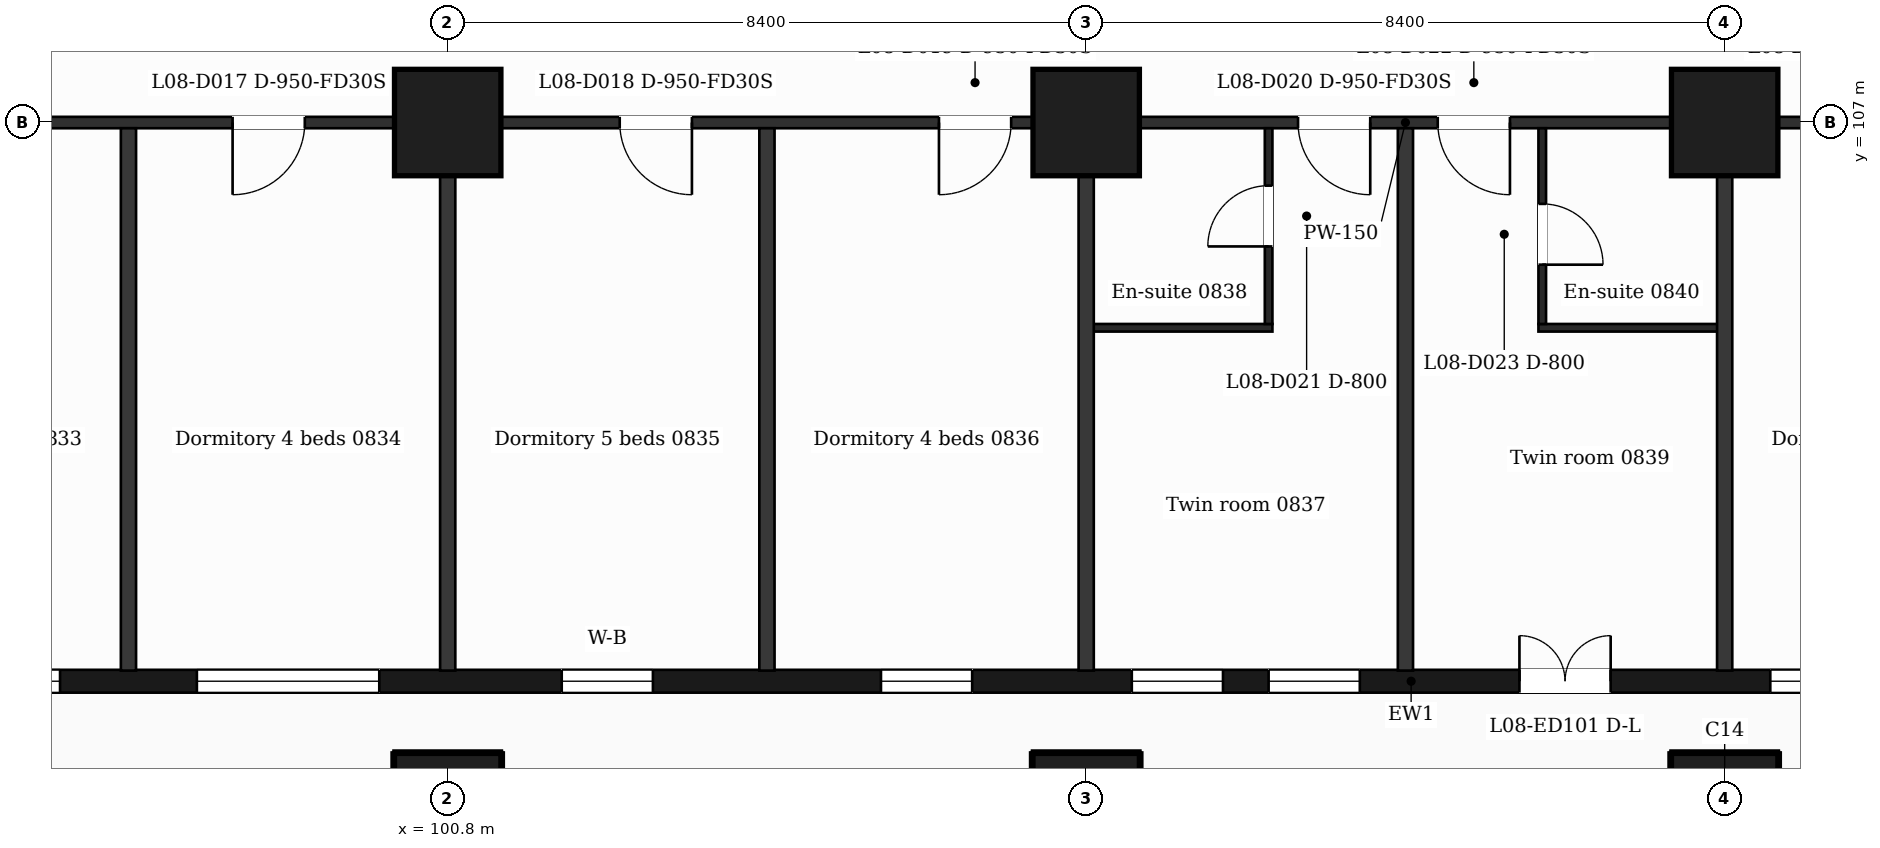
"""IFC4 building model, lengths in metres.
Left out: names, types, materials, properties, quantities, classifications, styles, units other than length and angle.
Written with IfcOpenShell. Run it as: python <this file> out.ifc"""

import sys

from ifc_helpers import new_model, si_unit, direction, frame, frame_2d, origin, origin_2d, place, context, subcontext, project, spatial, rectangle, extrude, element, fill, save


model = new_model("IFC4")
c1 = context("Model", 3, precision=1e-05, world=origin(), true_north=direction((0.0, 1.0)))
c2 = subcontext(c1, "Body", "Model", "MODEL_VIEW")
j1 = project(units=[si_unit("LENGTHUNIT", "METRE"), si_unit("PLANEANGLEUNIT", "RADIAN")], contexts=[c1])
p1 = place(None, origin())
s1 = spatial("IfcSite", under=j1, at=p1, CompositionType="ELEMENT")
p2 = place(p1, origin())
s2 = spatial("IfcBuilding", under=s1, at=p2, CompositionType="ELEMENT")
p3 = place(p2, frame((0.0, 0.0, 46.0)))
s3 = spatial("IfcBuildingStorey", under=s2, at=p3, CompositionType="ELEMENT", Elevation=46.0)
for number, where, z_axis, x_axis in (
    (1, (100.8, 98.0, 0.0), (0.0, 0.0, 1.0), (1.0, 0.0, 0.0)),
    (2, (109.2, 98.0, 0.0), (0.0, 0.0, 1.0), (1.0, 0.0, 0.0)),
    (3, (117.6, 98.0, 0.0), (0.0, 0.0, 1.0), (1.0, 0.0, 0.0)),
    (4, (100.8, 107.0, 0.0), (0.0, 0.0, 1.0), (1.0, 0.0, 0.0)),
    (5, (109.2, 107.0, 0.0), (0.0, 0.0, 1.0), (1.0, 0.0, 0.0)),
    (6, (117.6, 107.0, 0.0), (0.0, 0.0, 1.0), (1.0, 0.0, 0.0)),
):
    element("IfcColumn", number, at=place(p3, frame(where, z_axis=z_axis, x_axis=x_axis)), inside=s3, PredefinedType="COLUMN", context=c2, shape_type="SweptSolid", body=[
        extrude(rectangle(XDim=1.4, YDim=1.4, at=origin_2d()), origin(), (0.0, 0.0, 1.0), 3.5),
    ])
p4 = place(p3, frame((89.85, 99.65, 0.0), z_axis=(0.0, 0.0, 1.0), x_axis=(1.0, 0.0, 0.0)))
e7 = element("IfcWall", 7, at=p4, inside=s3, PredefinedType="SOLIDWALL", context=c2, shape_type="SweptSolid", body=[
    extrude(rectangle(XDim=47.25, YDim=0.3, at=frame_2d((23.625, 0.0))), origin(), (0.0, 0.0, 1.0), 3.18),
])
p5 = place(p4, frame((0.725, 0.0, 0.9)))
e8 = element("IfcOpeningElement", 8, at=p5, cuts=e7, PredefinedType="OPENING", context=c2, shape_type="SweptSolid", body=[
    extrude(rectangle(XDim=1.2, YDim=2.1, at=frame_2d((0.6, 1.05))), frame((0.0, 0.16, 0.0), z_axis=(0.0, -1.0, 0.0), x_axis=(1.0, 0.0, 0.0)), (0.0, 0.0, 1.0), 0.32),
])
p6 = place(p4, frame((3.45, 0.0, 0.9)))
e9 = element("IfcOpeningElement", 9, at=p6, cuts=e7, PredefinedType="OPENING", context=c2, shape_type="SweptSolid", body=[
    extrude(rectangle(XDim=2.4, YDim=2.1, at=frame_2d((1.2, 1.05))), frame((0.0, 0.16, 0.0), z_axis=(0.0, -1.0, 0.0), x_axis=(1.0, 0.0, 0.0)), (0.0, 0.0, 1.0), 0.32),
])
p7 = place(p4, frame((7.65, 0.0, 0.9)))
e10 = element("IfcOpeningElement", 10, at=p7, cuts=e7, PredefinedType="OPENING", context=c2, shape_type="SweptSolid", body=[
    extrude(rectangle(XDim=2.4, YDim=2.1, at=frame_2d((1.2, 1.05))), frame((0.0, 0.16, 0.0), z_axis=(0.0, -1.0, 0.0), x_axis=(1.0, 0.0, 0.0)), (0.0, 0.0, 1.0), 0.32),
])
p8 = place(p4, frame((12.45, 0.0, 0.9)))
e11 = element("IfcOpeningElement", 11, at=p8, cuts=e7, PredefinedType="OPENING", context=c2, shape_type="SweptSolid", body=[
    extrude(rectangle(XDim=1.2, YDim=2.1, at=frame_2d((0.6, 1.05))), frame((0.0, 0.16, 0.0), z_axis=(0.0, -1.0, 0.0), x_axis=(1.0, 0.0, 0.0)), (0.0, 0.0, 1.0), 0.32),
])
p9 = place(p4, frame((16.65, 0.0, 0.9)))
e12 = element("IfcOpeningElement", 12, at=p9, cuts=e7, PredefinedType="OPENING", context=c2, shape_type="SweptSolid", body=[
    extrude(rectangle(XDim=1.2, YDim=2.1, at=frame_2d((0.6, 1.05))), frame((0.0, 0.16, 0.0), z_axis=(0.0, -1.0, 0.0), x_axis=(1.0, 0.0, 0.0)), (0.0, 0.0, 1.0), 0.32),
])
p10 = place(p4, frame((19.95, 0.0, 0.9)))
e13 = element("IfcOpeningElement", 13, at=p10, cuts=e7, PredefinedType="OPENING", context=c2, shape_type="SweptSolid", body=[
    extrude(rectangle(XDim=1.2, YDim=2.1, at=frame_2d((0.6, 1.05))), frame((0.0, 0.16, 0.0), z_axis=(0.0, -1.0, 0.0), x_axis=(1.0, 0.0, 0.0)), (0.0, 0.0, 1.0), 0.32),
])
p11 = place(p4, frame((21.75, 0.0, 0.9)))
e14 = element("IfcOpeningElement", 14, at=p11, cuts=e7, PredefinedType="OPENING", context=c2, shape_type="SweptSolid", body=[
    extrude(rectangle(XDim=1.2, YDim=2.1, at=frame_2d((0.6, 1.05))), frame((0.0, 0.16, 0.0), z_axis=(0.0, -1.0, 0.0), x_axis=(1.0, 0.0, 0.0)), (0.0, 0.0, 1.0), 0.32),
])
p12 = place(p4, frame((25.05, 0.0, 0.0)))
e15 = element("IfcOpeningElement", 15, at=p12, cuts=e7, PredefinedType="OPENING", context=c2, shape_type="SweptSolid", body=[
    extrude(rectangle(XDim=1.2, YDim=2.4, at=frame_2d((0.6, 1.2))), frame((0.0, 0.16, 0.0), z_axis=(0.0, -1.0, 0.0), x_axis=(1.0, 0.0, 0.0)), (0.0, 0.0, 1.0), 0.32),
])
p13 = place(p4, frame((28.35, 0.0, 0.9)))
e16 = element("IfcOpeningElement", 16, at=p13, cuts=e7, PredefinedType="OPENING", context=c2, shape_type="SweptSolid", body=[
    extrude(rectangle(XDim=1.2, YDim=2.1, at=frame_2d((0.6, 1.05))), frame((0.0, 0.16, 0.0), z_axis=(0.0, -1.0, 0.0), x_axis=(1.0, 0.0, 0.0)), (0.0, 0.0, 1.0), 0.32),
])
p14 = place(p4, frame((30.15, 0.0, 0.9)))
e17 = element("IfcOpeningElement", 17, at=p14, cuts=e7, PredefinedType="OPENING", context=c2, shape_type="SweptSolid", body=[
    extrude(rectangle(XDim=1.2, YDim=2.1, at=frame_2d((0.6, 1.05))), frame((0.0, 0.16, 0.0), z_axis=(0.0, -1.0, 0.0), x_axis=(1.0, 0.0, 0.0)), (0.0, 0.0, 1.0), 0.32),
])
p15 = place(p4, frame((32.85, 0.0, 0.9)))
e18 = element("IfcOpeningElement", 18, at=p15, cuts=e7, PredefinedType="OPENING", context=c2, shape_type="SweptSolid", body=[
    extrude(rectangle(XDim=2.4, YDim=2.1, at=frame_2d((1.2, 1.05))), frame((0.0, 0.16, 0.0), z_axis=(0.0, -1.0, 0.0), x_axis=(1.0, 0.0, 0.0)), (0.0, 0.0, 1.0), 0.32),
])
p16 = place(p4, frame((37.05, 0.0, 0.9)))
e19 = element("IfcOpeningElement", 19, at=p16, cuts=e7, PredefinedType="OPENING", context=c2, shape_type="SweptSolid", body=[
    extrude(rectangle(XDim=2.4, YDim=2.1, at=frame_2d((1.2, 1.05))), frame((0.0, 0.16, 0.0), z_axis=(0.0, -1.0, 0.0), x_axis=(1.0, 0.0, 0.0)), (0.0, 0.0, 1.0), 0.32),
])
p17 = place(p4, frame((41.85, 0.0, 0.9)))
e20 = element("IfcOpeningElement", 20, at=p17, cuts=e7, PredefinedType="OPENING", context=c2, shape_type="SweptSolid", body=[
    extrude(rectangle(XDim=1.2, YDim=2.1, at=frame_2d((0.6, 1.05))), frame((0.0, 0.16, 0.0), z_axis=(0.0, -1.0, 0.0), x_axis=(1.0, 0.0, 0.0)), (0.0, 0.0, 1.0), 0.32),
])
p18 = place(p4, frame((45.25, 0.0, 0.9)))
e21 = element("IfcOpeningElement", 21, at=p18, cuts=e7, PredefinedType="OPENING", context=c2, shape_type="SweptSolid", body=[
    extrude(rectangle(XDim=1.2, YDim=2.1, at=frame_2d((0.6, 1.05))), frame((0.0, 0.16, 0.0), z_axis=(0.0, -1.0, 0.0), x_axis=(1.0, 0.0, 0.0)), (0.0, 0.0, 1.0), 0.32),
])
p19 = place(p3, frame((109.2, 104.3, 0.0), z_axis=(0.0, 0.0, 1.0), x_axis=(1.0, 0.0, 0.0)))
e22 = element("IfcWall", 22, at=p19, inside=s3, PredefinedType="PARTITIONING", context=c2, shape_type="SweptSolid", body=[
    extrude(rectangle(XDim=2.45, YDim=0.1, at=frame_2d((1.225, 0.0))), origin(), (0.0, 0.0, 1.0), 3.18),
])
p20 = place(p3, frame((115.15, 104.3, 0.0), z_axis=(0.0, 0.0, 1.0), x_axis=(1.0, 0.0, 0.0)))
e23 = element("IfcWall", 23, at=p20, inside=s3, PredefinedType="PARTITIONING", context=c2, shape_type="SweptSolid", body=[
    extrude(rectangle(XDim=2.45, YDim=0.1, at=frame_2d((1.225, 0.0))), origin(), (0.0, 0.0, 1.0), 3.18),
])
p21 = place(p3, frame((87.018, 107.0, 0.0), z_axis=(0.0, 0.0, 1.0), x_axis=(1.0, 0.0, 0.0)))
e24 = element("IfcWall", 24, at=p21, inside=s3, PredefinedType="PARTITIONING", context=c2, shape_type="SweptSolid", body=[
    extrude(rectangle(XDim=52.765, YDim=0.15, at=frame_2d((26.382, 0.0))), origin(), (0.0, 0.0, 1.0), 3.18),
])
p22 = place(p21, frame((1.032, 0.0, 0.0)))
e25 = element("IfcOpeningElement", 25, at=p22, cuts=e24, PredefinedType="OPENING", context=c2, shape_type="SweptSolid", body=[
    extrude(rectangle(XDim=0.95, YDim=2.1, at=frame_2d((0.475, 1.05))), frame((0.0, 0.085, 0.0), z_axis=(0.0, -1.0, 0.0), x_axis=(1.0, 0.0, 0.0)), (0.0, 0.0, 1.0), 0.17),
])
p23 = place(p21, frame((6.369, 0.0, 0.0)))
e26 = element("IfcOpeningElement", 26, at=p23, cuts=e24, PredefinedType="OPENING", context=c2, shape_type="SweptSolid", body=[
    extrude(rectangle(XDim=0.95, YDim=2.1, at=frame_2d((0.475, 1.05))), frame((0.0, 0.085, 0.0), z_axis=(0.0, -1.0, 0.0), x_axis=(1.0, 0.0, 0.0)), (0.0, 0.0, 1.0), 0.17),
])
p24 = place(p21, frame((10.952, 0.0, 0.0)))
e27 = element("IfcOpeningElement", 27, at=p24, cuts=e24, PredefinedType="OPENING", context=c2, shape_type="SweptSolid", body=[
    extrude(rectangle(XDim=0.95, YDim=2.1, at=frame_2d((0.475, 1.05))), frame((0.0, 0.085, 0.0), z_axis=(0.0, -1.0, 0.0), x_axis=(1.0, 0.0, 0.0)), (0.0, 0.0, 1.0), 0.17),
])
p25 = place(p21, frame((16.045, 0.0, 0.0)))
e28 = element("IfcOpeningElement", 28, at=p25, cuts=e24, PredefinedType="OPENING", context=c2, shape_type="SweptSolid", body=[
    extrude(rectangle(XDim=0.95, YDim=2.1, at=frame_2d((0.475, 1.05))), frame((0.0, 0.085, 0.0), z_axis=(0.0, -1.0, 0.0), x_axis=(1.0, 0.0, 0.0)), (0.0, 0.0, 1.0), 0.17),
])
p26 = place(p21, frame((20.245, 0.0, 0.0)))
e29 = element("IfcOpeningElement", 29, at=p26, cuts=e24, PredefinedType="OPENING", context=c2, shape_type="SweptSolid", body=[
    extrude(rectangle(XDim=0.95, YDim=2.1, at=frame_2d((0.475, 1.05))), frame((0.0, 0.085, 0.0), z_axis=(0.0, -1.0, 0.0), x_axis=(1.0, 0.0, 0.0)), (0.0, 0.0, 1.0), 0.17),
])
p27 = place(p21, frame((24.969, 0.0, 0.0)))
e30 = element("IfcOpeningElement", 30, at=p27, cuts=e24, PredefinedType="OPENING", context=c2, shape_type="SweptSolid", body=[
    extrude(rectangle(XDim=0.95, YDim=2.1, at=frame_2d((0.475, 1.05))), frame((0.0, 0.085, 0.0), z_axis=(0.0, -1.0, 0.0), x_axis=(1.0, 0.0, 0.0)), (0.0, 0.0, 1.0), 0.17),
])
p28 = place(p21, frame((26.807, 0.0, 0.0)))
e31 = element("IfcOpeningElement", 31, at=p28, cuts=e24, PredefinedType="OPENING", context=c2, shape_type="SweptSolid", body=[
    extrude(rectangle(XDim=0.95, YDim=2.1, at=frame_2d((0.475, 1.05))), frame((0.0, 0.085, 0.0), z_axis=(0.0, -1.0, 0.0), x_axis=(1.0, 0.0, 0.0)), (0.0, 0.0, 1.0), 0.17),
])
p29 = place(p21, frame((31.952, 0.0, 0.0)))
e32 = element("IfcOpeningElement", 32, at=p29, cuts=e24, PredefinedType="OPENING", context=c2, shape_type="SweptSolid", body=[
    extrude(rectangle(XDim=0.95, YDim=2.1, at=frame_2d((0.475, 1.05))), frame((0.0, 0.085, 0.0), z_axis=(0.0, -1.0, 0.0), x_axis=(1.0, 0.0, 0.0)), (0.0, 0.0, 1.0), 0.17),
])
p30 = place(p21, frame((40.795, 0.0, 0.0)))
e33 = element("IfcOpeningElement", 33, at=p30, cuts=e24, PredefinedType="OPENING", context=c2, shape_type="SweptSolid", body=[
    extrude(rectangle(XDim=0.95, YDim=2.1, at=frame_2d((0.475, 1.05))), frame((0.0, 0.085, 0.0), z_axis=(0.0, -1.0, 0.0), x_axis=(1.0, 0.0, 0.0)), (0.0, 0.0, 1.0), 0.17),
])
p31 = place(p21, frame((43.644, 0.0, 0.0)))
e34 = element("IfcOpeningElement", 34, at=p31, cuts=e24, PredefinedType="OPENING", context=c2, shape_type="SweptSolid", body=[
    extrude(rectangle(XDim=0.95, YDim=2.1, at=frame_2d((0.475, 1.05))), frame((0.0, 0.085, 0.0), z_axis=(0.0, -1.0, 0.0), x_axis=(1.0, 0.0, 0.0)), (0.0, 0.0, 1.0), 0.17),
])
p32 = place(p21, frame((48.767, 0.0, 0.0)))
e35 = element("IfcOpeningElement", 35, at=p32, cuts=e24, PredefinedType="OPENING", context=c2, shape_type="SweptSolid", body=[
    extrude(rectangle(XDim=0.95, YDim=2.1, at=frame_2d((0.475, 1.05))), frame((0.0, 0.085, 0.0), z_axis=(0.0, -1.0, 0.0), x_axis=(1.0, 0.0, 0.0)), (0.0, 0.0, 1.0), 0.17),
])
for number, where, z_axis, x_axis in (
    (36, (96.6, 99.79, 0.0), (0.0, 0.0, 1.0), (0.0, 1.0, 0.0)),
    (37, (100.8, 99.79, 0.0), (0.0, 0.0, 1.0), (0.0, 1.0, 0.0)),
    (38, (105.0, 99.79, 0.0), (0.0, 0.0, 1.0), (0.0, 1.0, 0.0)),
    (39, (109.2, 99.79, 0.0), (0.0, 0.0, 1.0), (0.0, 1.0, 0.0)),
):
    element("IfcWall", number, at=place(p3, frame(where, z_axis=z_axis, x_axis=x_axis)), inside=s3, PredefinedType="PARTITIONING", context=c2, shape_type="SweptSolid", body=[
        extrude(rectangle(XDim=7.135, YDim=0.2, at=frame_2d((3.567, 0.0))), origin(), (0.0, 0.0, 1.0), 3.18),
    ])
p33 = place(p3, frame((111.6, 104.35, 0.0), z_axis=(0.0, 0.0, 1.0), x_axis=(0.0, 1.0, 0.0)))
e40 = element("IfcWall", 40, at=p33, inside=s3, PredefinedType="PARTITIONING", context=c2, shape_type="SweptSolid", body=[
    extrude(rectangle(XDim=2.575, YDim=0.1, at=frame_2d((1.288, 0.0))), origin(), (0.0, 0.0, 1.0), 3.18),
])
p34 = place(p33, frame((1.02, 0.0, 0.0)))
e41 = element("IfcOpeningElement", 41, at=p34, cuts=e40, PredefinedType="OPENING", context=c2, shape_type="SweptSolid", body=[
    extrude(rectangle(XDim=0.8, YDim=2.1, at=frame_2d((0.4, 1.05))), frame((0.0, 0.06, 0.0), z_axis=(0.0, -1.0, 0.0), x_axis=(1.0, 0.0, 0.0)), (0.0, 0.0, 1.0), 0.12),
])
p35 = place(p3, frame((113.4, 99.79, 0.0), z_axis=(0.0, 0.0, 1.0), x_axis=(0.0, 1.0, 0.0)))
e42 = element("IfcWall", 42, at=p35, inside=s3, PredefinedType="PARTITIONING", context=c2, shape_type="SweptSolid", body=[
    extrude(rectangle(XDim=7.135, YDim=0.2, at=frame_2d((3.567, 0.0))), origin(), (0.0, 0.0, 1.0), 3.18),
])
p36 = place(p3, frame((115.2, 104.35, 0.0), z_axis=(0.0, 0.0, 1.0), x_axis=(0.0, 1.0, 0.0)))
e43 = element("IfcWall", 43, at=p36, inside=s3, PredefinedType="PARTITIONING", context=c2, shape_type="SweptSolid", body=[
    extrude(rectangle(XDim=2.575, YDim=0.1, at=frame_2d((1.288, 0.0))), origin(), (0.0, 0.0, 1.0), 3.18),
])
p37 = place(p36, frame((0.78, 0.0, 0.0)))
e44 = element("IfcOpeningElement", 44, at=p37, cuts=e43, PredefinedType="OPENING", context=c2, shape_type="SweptSolid", body=[
    extrude(rectangle(XDim=0.8, YDim=2.1, at=frame_2d((0.4, 1.05))), frame((0.0, 0.06, 0.0), z_axis=(0.0, -1.0, 0.0), x_axis=(1.0, 0.0, 0.0)), (0.0, 0.0, 1.0), 0.12),
])
p38 = place(p3, frame((117.6, 99.79, 0.0), z_axis=(0.0, 0.0, 1.0), x_axis=(0.0, 1.0, 0.0)))
e45 = element("IfcWall", 45, at=p38, inside=s3, PredefinedType="PARTITIONING", context=c2, shape_type="SweptSolid", body=[
    extrude(rectangle(XDim=7.135, YDim=0.2, at=frame_2d((3.567, 0.0))), origin(), (0.0, 0.0, 1.0), 3.18),
])
p39 = place(p6, origin())
e46 = element("IfcWindow", 46, at=p39, inside=s3, PartitioningType="SINGLE_PANEL", PredefinedType="WINDOW", context=c2, shape_type="SweptSolid", body=[
    extrude(rectangle(XDim=2.4, YDim=2.1, at=frame_2d((1.2, 1.05))), frame((0.0, 0.03, 0.0), z_axis=(0.0, -1.0, 0.0), x_axis=(1.0, 0.0, 0.0)), (0.0, 0.0, 1.0), 0.06),
])
fill(e9, e46)
p40 = place(p7, origin())
e47 = element("IfcWindow", 47, at=p40, inside=s3, PartitioningType="SINGLE_PANEL", PredefinedType="WINDOW", context=c2, shape_type="SweptSolid", body=[
    extrude(rectangle(XDim=2.4, YDim=2.1, at=frame_2d((1.2, 1.05))), frame((0.0, 0.03, 0.0), z_axis=(0.0, -1.0, 0.0), x_axis=(1.0, 0.0, 0.0)), (0.0, 0.0, 1.0), 0.06),
])
fill(e10, e47)
p41 = place(p8, origin())
e48 = element("IfcWindow", 48, at=p41, inside=s3, PartitioningType="SINGLE_PANEL", PredefinedType="WINDOW", context=c2, shape_type="SweptSolid", body=[
    extrude(rectangle(XDim=1.2, YDim=2.1, at=frame_2d((0.6, 1.05))), frame((0.0, 0.03, 0.0), z_axis=(0.0, -1.0, 0.0), x_axis=(1.0, 0.0, 0.0)), (0.0, 0.0, 1.0), 0.06),
])
fill(e11, e48)
p42 = place(p9, origin())
e49 = element("IfcWindow", 49, at=p42, inside=s3, PartitioningType="SINGLE_PANEL", PredefinedType="WINDOW", context=c2, shape_type="SweptSolid", body=[
    extrude(rectangle(XDim=1.2, YDim=2.1, at=frame_2d((0.6, 1.05))), frame((0.0, 0.03, 0.0), z_axis=(0.0, -1.0, 0.0), x_axis=(1.0, 0.0, 0.0)), (0.0, 0.0, 1.0), 0.06),
])
fill(e12, e49)
p43 = place(p10, origin())
e50 = element("IfcWindow", 50, at=p43, inside=s3, PartitioningType="SINGLE_PANEL", PredefinedType="WINDOW", context=c2, shape_type="SweptSolid", body=[
    extrude(rectangle(XDim=1.2, YDim=2.1, at=frame_2d((0.6, 1.05))), frame((0.0, 0.03, 0.0), z_axis=(0.0, -1.0, 0.0), x_axis=(1.0, 0.0, 0.0)), (0.0, 0.0, 1.0), 0.06),
])
fill(e13, e50)
p44 = place(p11, origin())
e51 = element("IfcWindow", 51, at=p44, inside=s3, PartitioningType="SINGLE_PANEL", PredefinedType="WINDOW", context=c2, shape_type="SweptSolid", body=[
    extrude(rectangle(XDim=1.2, YDim=2.1, at=frame_2d((0.6, 1.05))), frame((0.0, 0.03, 0.0), z_axis=(0.0, -1.0, 0.0), x_axis=(1.0, 0.0, 0.0)), (0.0, 0.0, 1.0), 0.06),
])
fill(e14, e51)
p45 = place(p12, origin())
e52 = element("IfcDoor", 52, at=p45, inside=s3, OperationType="DOUBLE_DOOR_SINGLE_SWING", PredefinedType="DOOR", context=c2, shape_type="SweptSolid", body=[
    extrude(rectangle(XDim=1.2, YDim=2.4, at=frame_2d((0.6, 1.2))), frame((0.0, 0.025, 0.0), z_axis=(0.0, -1.0, 0.0), x_axis=(1.0, 0.0, 0.0)), (0.0, 0.0, 1.0), 0.05),
])
fill(e15, e52)
p46 = place(p13, origin())
e53 = element("IfcWindow", 53, at=p46, inside=s3, PartitioningType="SINGLE_PANEL", PredefinedType="WINDOW", context=c2, shape_type="SweptSolid", body=[
    extrude(rectangle(XDim=1.2, YDim=2.1, at=frame_2d((0.6, 1.05))), frame((0.0, 0.03, 0.0), z_axis=(0.0, -1.0, 0.0), x_axis=(1.0, 0.0, 0.0)), (0.0, 0.0, 1.0), 0.06),
])
fill(e16, e53)
p47 = place(p24, origin())
e54 = element("IfcDoor", 54, at=p47, inside=s3, OperationType="SINGLE_SWING_LEFT", PredefinedType="DOOR", context=c2, shape_type="SweptSolid", body=[
    extrude(rectangle(XDim=0.95, YDim=2.1, at=frame_2d((0.475, 1.05))), frame((0.0, 0.025, 0.0), z_axis=(0.0, -1.0, 0.0), x_axis=(1.0, 0.0, 0.0)), (0.0, 0.0, 1.0), 0.05),
])
fill(e27, e54)
p48 = place(p25, origin())
e55 = element("IfcDoor", 55, at=p48, inside=s3, OperationType="SINGLE_SWING_RIGHT", PredefinedType="DOOR", context=c2, shape_type="SweptSolid", body=[
    extrude(rectangle(XDim=0.95, YDim=2.1, at=frame_2d((0.475, 1.05))), frame((0.0, 0.025, 0.0), z_axis=(0.0, -1.0, 0.0), x_axis=(1.0, 0.0, 0.0)), (0.0, 0.0, 1.0), 0.05),
])
fill(e28, e55)
p49 = place(p26, origin())
e56 = element("IfcDoor", 56, at=p49, inside=s3, OperationType="SINGLE_SWING_LEFT", PredefinedType="DOOR", context=c2, shape_type="SweptSolid", body=[
    extrude(rectangle(XDim=0.95, YDim=2.1, at=frame_2d((0.475, 1.05))), frame((0.0, 0.025, 0.0), z_axis=(0.0, -1.0, 0.0), x_axis=(1.0, 0.0, 0.0)), (0.0, 0.0, 1.0), 0.05),
])
fill(e29, e56)
p50 = place(p27, origin())
e57 = element("IfcDoor", 57, at=p50, inside=s3, OperationType="SINGLE_SWING_RIGHT", PredefinedType="DOOR", context=c2, shape_type="SweptSolid", body=[
    extrude(rectangle(XDim=0.95, YDim=2.1, at=frame_2d((0.475, 1.05))), frame((0.0, 0.025, 0.0), z_axis=(0.0, -1.0, 0.0), x_axis=(1.0, 0.0, 0.0)), (0.0, 0.0, 1.0), 0.05),
])
fill(e30, e57)
p51 = place(p34, origin())
e58 = element("IfcDoor", 58, at=p51, inside=s3, OperationType="SINGLE_SWING_LEFT", PredefinedType="DOOR", context=c2, shape_type="SweptSolid", body=[
    extrude(rectangle(XDim=0.8, YDim=2.1, at=frame_2d((0.4, 1.05))), frame((0.0, 0.025, 0.0), z_axis=(0.0, -1.0, 0.0), x_axis=(1.0, 0.0, 0.0)), (0.0, 0.0, 1.0), 0.05),
])
fill(e41, e58)
p52 = place(p28, origin())
e59 = element("IfcDoor", 59, at=p52, inside=s3, OperationType="SINGLE_SWING_RIGHT", PredefinedType="DOOR", context=c2, shape_type="SweptSolid", body=[
    extrude(rectangle(XDim=0.95, YDim=2.1, at=frame_2d((0.475, 1.05))), frame((0.0, 0.025, 0.0), z_axis=(0.0, -1.0, 0.0), x_axis=(1.0, 0.0, 0.0)), (0.0, 0.0, 1.0), 0.05),
])
fill(e31, e59)
p53 = place(p37, origin())
e60 = element("IfcDoor", 60, at=p53, inside=s3, OperationType="SINGLE_SWING_LEFT", PredefinedType="DOOR", context=c2, shape_type="SweptSolid", body=[
    extrude(rectangle(XDim=0.8, YDim=2.1, at=frame_2d((0.4, 1.05))), frame((0.0, 0.025, 0.0), z_axis=(0.0, -1.0, 0.0), x_axis=(1.0, 0.0, 0.0)), (0.0, 0.0, 1.0), 0.05),
])
fill(e44, e60)
save(model, sys.argv[1])
